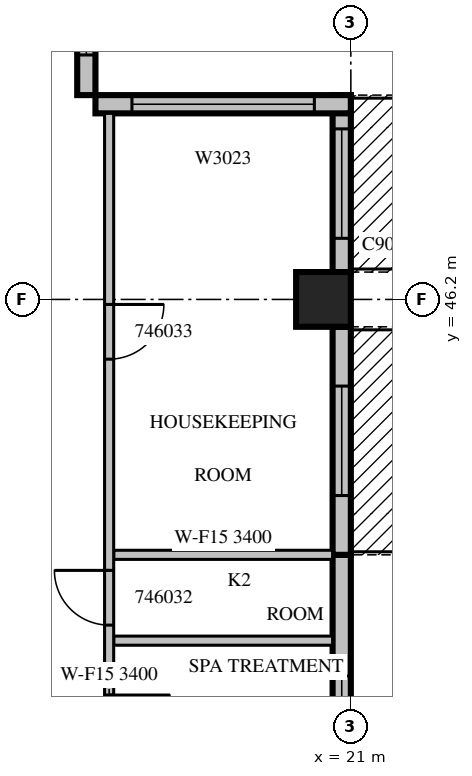
"""IFC4 building model, lengths in metres.
Left out: names, types, materials, properties, quantities, classifications, styles, units other than length and angle.
Written with IfcOpenShell. Run it as: python <this file> out.ifc"""

import sys

from ifc_helpers import new_model, si_unit, direction, frame, frame_2d, origin, origin_2d, place, context, subcontext, project, spatial, rectangle, extrude, source, transform, mapped, element, fill, save


model = new_model("IFC4")
c1 = context("Model", 3, precision=1e-05, world=origin(), true_north=direction((0.0, 1.0)))
c2 = subcontext(c1, "Body", "Model", "MODEL_VIEW")
j1 = project(units=[si_unit("LENGTHUNIT", "METRE"), si_unit("PLANEANGLEUNIT", "RADIAN")], contexts=[c1])
p1 = place(None, origin())
s1 = spatial("IfcSite", under=j1, at=p1, CompositionType="ELEMENT")
p2 = place(p1, origin())
s2 = spatial("IfcBuilding", under=s1, at=p2, CompositionType="ELEMENT")
p3 = place(p2, frame((0.0, 0.0, 208.2)))
s3 = spatial("IfcBuildingStorey", under=s2, at=p3, CompositionType="ELEMENT", Elevation=208.2)
m1 = source(origin(), c2, "Body", "SweptSolid", [
    extrude(rectangle(XDim=0.9, YDim=0.9, at=origin_2d()), origin(), (0.0, 0.0, 1.0), 3.8),
])
p4 = place(p3, frame((20.55, 46.2, 0.0), z_axis=(0.0, 0.0, 1.0), x_axis=(1.0, 0.0, 0.0)))
e1 = element("IfcColumn", 1, at=p4, inside=s3, PredefinedType="COLUMN", context=c2, shape_type="MappedRepresentation", body=[
    mapped(m1, transform((0.0, 0.0, 0.0), scale=1.0)),
])
m2 = source(origin(), c2, "Body", "SweptSolid", [
    extrude(rectangle(XDim=3.75, YDim=0.3, at=frame_2d((1.875, 0.0))), origin(), (0.0, 0.0, 1.0), 3.4),
])
p5 = place(p3, frame((20.85, 38.25, 0.0), z_axis=(0.0, 0.0, 1.0), x_axis=(0.0, 1.0, 0.0)))
e2 = element("IfcWall", 2, at=p5, inside=s3, PredefinedType="STANDARD", context=c2, shape_type="MappedRepresentation", body=[
    mapped(m2, transform((0.0, 0.0, 0.0), scale=1.0)),
])
m3 = source(origin(), c2, "Body", "SweptSolid", [
    extrude(rectangle(XDim=1.2, YDim=2.3, at=frame_2d((0.6, 1.15))), frame((0.0, 0.16, 0.0), z_axis=(0.0, -1.0, 0.0), x_axis=(1.0, 0.0, 0.0)), (0.0, 0.0, 1.0), 0.32),
])
p6 = place(p5, frame((0.557, 0.0, 0.6)))
e3 = element("IfcOpeningElement", 3, at=p6, cuts=e2, PredefinedType="OPENING", context=c2, shape_type="MappedRepresentation", body=[
    mapped(m3, transform((0.0, 0.0, 0.0), scale=1.0)),
])
p7 = place(p3, frame((20.85, 42.0, 0.0), z_axis=(0.0, 0.0, 1.0), x_axis=(0.0, 1.0, 0.0)))
e4 = element("IfcWall", 4, at=p7, inside=s3, PredefinedType="STANDARD", context=c2, shape_type="MappedRepresentation", body=[
    mapped(m2, transform((0.0, 0.0, 0.0), scale=1.0)),
])
m4 = source(origin(), c2, "Body", "SweptSolid", [
    extrude(rectangle(XDim=1.8, YDim=2.4, at=frame_2d((0.9, 1.2))), frame((0.0, 0.16, 0.0), z_axis=(0.0, -1.0, 0.0), x_axis=(1.0, 0.0, 0.0)), (0.0, 0.0, 1.0), 0.32),
])
p8 = place(p7, frame((0.975, 0.0, 0.0)))
e5 = element("IfcOpeningElement", 5, at=p8, cuts=e4, PredefinedType="OPENING", context=c2, shape_type="MappedRepresentation", body=[
    mapped(m4, transform((0.0, 0.0, 0.0), scale=1.0)),
])
m5 = source(origin(), c2, "Body", "SweptSolid", [
    extrude(rectangle(XDim=2.91, YDim=0.3, at=frame_2d((1.455, 0.0))), origin(), (0.0, 0.0, 1.0), 3.4),
])
p9 = place(p3, frame((20.85, 46.65, 0.0), z_axis=(0.0, 0.0, 1.0), x_axis=(0.0, 1.0, 0.0)))
e6 = element("IfcWall", 6, at=p9, inside=s3, PredefinedType="STANDARD", context=c2, shape_type="MappedRepresentation", body=[
    mapped(m5, transform((0.0, 0.0, 0.0), scale=1.0)),
])
p10 = place(p9, frame((0.555, 0.0, 0.0)))
e7 = element("IfcOpeningElement", 7, at=p10, cuts=e6, PredefinedType="OPENING", context=c2, shape_type="MappedRepresentation", body=[
    mapped(m4, transform((0.0, 0.0, 0.0), scale=1.0)),
])
m6 = source(origin(), c2, "Body", "SweptSolid", [
    extrude(rectangle(XDim=4.2, YDim=0.3, at=frame_2d((2.1, 0.0))), origin(), (0.0, 0.0, 1.0), 3.4),
])
p11 = place(p3, frame((21.0, 49.41, 0.0), z_axis=(0.0, 0.0, 1.0), x_axis=(-1.0, 0.0, 0.0)))
e8 = element("IfcWall", 8, at=p11, inside=s3, PredefinedType="STANDARD", context=c2, shape_type="MappedRepresentation", body=[
    mapped(m6, transform((0.0, 0.0, 0.0), scale=1.0)),
])
m7 = source(origin(), c2, "Body", "SweptSolid", [
    extrude(rectangle(XDim=3.0, YDim=2.3, at=frame_2d((1.5, 1.15))), frame((0.0, 0.16, 0.0), z_axis=(0.0, -1.0, 0.0), x_axis=(1.0, 0.0, 0.0)), (0.0, 0.0, 1.0), 0.32),
])
p12 = place(p11, frame((0.6, 0.0, 0.6)))
e9 = element("IfcOpeningElement", 9, at=p12, cuts=e8, PredefinedType="OPENING", context=c2, shape_type="MappedRepresentation", body=[
    mapped(m7, transform((0.0, 0.0, 0.0), scale=1.0)),
])
m8 = source(origin(), c2, "Body", "SweptSolid", [
    extrude(rectangle(XDim=2.52, YDim=0.3, at=frame_2d((1.26, 0.0))), origin(), (0.0, 0.0, 1.0), 3.4),
])
p13 = place(p3, frame((16.65, 49.56, 0.0), z_axis=(0.0, 0.0, 1.0), x_axis=(0.0, 1.0, 0.0)))
e10 = element("IfcWall", 10, at=p13, inside=s3, PredefinedType="STANDARD", context=c2, shape_type="MappedRepresentation", body=[
    mapped(m8, transform((0.0, 0.0, 0.0), scale=1.0)),
])
p14 = place(p13, frame((0.66, 0.0, 0.6)))
e11 = element("IfcOpeningElement", 11, at=p14, cuts=e10, PredefinedType="OPENING", context=c2, shape_type="MappedRepresentation", body=[
    mapped(m3, transform((0.0, 0.0, 0.0), scale=1.0)),
])
m9 = source(origin(), c2, "Body", "SweptSolid", [
    extrude(rectangle(XDim=3.6, YDim=0.15, at=frame_2d((1.8, 0.0))), origin(), (0.0, 0.0, 1.0), 3.4),
])
for number, where, z_axis, x_axis in (
    (12, (17.1, 40.589, 0.0), (0.0, 0.0, 1.0), (1.0, 0.0, 0.0)),
    (13, (20.7, 42.0, 0.0), (0.0, 0.0, 1.0), (-1.0, 0.0, 0.0)),
):
    element("IfcWall", number, at=place(p3, frame(where, z_axis=z_axis, x_axis=x_axis)), inside=s3, PredefinedType="PARTITIONING", context=c2, shape_type="MappedRepresentation", body=[
        mapped(m9, transform((0.0, 0.0, 0.0), scale=1.0)),
    ])
m10 = source(origin(), c2, "Body", "SweptSolid", [
    extrude(rectangle(XDim=19.86, YDim=0.15, at=frame_2d((9.93, 0.0))), origin(), (0.0, 0.0, 1.0), 3.4),
])
p15 = place(p3, frame((17.025, 49.26, 0.0), z_axis=(0.0, 0.0, 1.0), x_axis=(0.0, -1.0, 0.0)))
e14 = element("IfcWall", 14, at=p15, inside=s3, PredefinedType="PARTITIONING", context=c2, shape_type="MappedRepresentation", body=[
    mapped(m10, transform((0.0, 0.0, 0.0), scale=1.0)),
])
m11 = source(origin(), c2, "Body", "SweptSolid", [
    extrude(rectangle(XDim=1.0, YDim=2.1, at=frame_2d((0.5, 1.05))), frame((0.0, 0.085, 0.0), z_axis=(0.0, -1.0, 0.0), x_axis=(1.0, 0.0, 0.0)), (0.0, 0.0, 1.0), 0.17),
])
p16 = place(p15, frame((16.598, 0.0, 0.0)))
e15 = element("IfcOpeningElement", 15, at=p16, cuts=e14, PredefinedType="OPENING", context=c2, shape_type="MappedRepresentation", body=[
    mapped(m11, transform((0.0, 0.0, 0.0), scale=1.0)),
])
p17 = place(p15, frame((9.566, 0.0, 0.0)))
e16 = element("IfcOpeningElement", 16, at=p17, cuts=e14, PredefinedType="OPENING", context=c2, shape_type="MappedRepresentation", body=[
    mapped(m11, transform((0.0, 0.0, 0.0), scale=1.0)),
])
m12 = source(origin(), c2, "Body", "SweptSolid", [
    extrude(rectangle(XDim=0.9, YDim=2.1, at=frame_2d((0.45, 1.05))), frame((0.0, 0.085, 0.0), z_axis=(0.0, -1.0, 0.0), x_axis=(1.0, 0.0, 0.0)), (0.0, 0.0, 1.0), 0.17),
])
p18 = place(p15, frame((7.516, 0.0, 0.0)))
e17 = element("IfcOpeningElement", 17, at=p18, cuts=e14, PredefinedType="OPENING", context=c2, shape_type="MappedRepresentation", body=[
    mapped(m12, transform((0.0, 0.0, 0.0), scale=1.0)),
])
p19 = place(p15, frame((3.143, 0.0, 0.0)))
e18 = element("IfcOpeningElement", 18, at=p19, cuts=e14, PredefinedType="OPENING", context=c2, shape_type="MappedRepresentation", body=[
    mapped(m12, transform((0.0, 0.0, 0.0), scale=1.0)),
])
m13 = source(origin(), c2, "Body", "SweptSolid", [
    extrude(rectangle(XDim=1.2, YDim=2.3, at=frame_2d((0.6, 1.15))), frame((0.0, 0.03, 0.0), z_axis=(0.0, -1.0, 0.0), x_axis=(1.0, 0.0, 0.0)), (0.0, 0.0, 1.0), 0.06),
])
p20 = place(p6, origin())
e19 = element("IfcWindow", 19, at=p20, inside=s3, PartitioningType="SINGLE_PANEL", PredefinedType="WINDOW", context=c2, shape_type="MappedRepresentation", body=[
    mapped(m13, transform((0.0, 0.0, 0.0), scale=1.0)),
])
fill(e3, e19)
m14 = source(origin(), c2, "Body", "SweptSolid", [
    extrude(rectangle(XDim=1.8, YDim=2.4, at=frame_2d((0.9, 1.2))), frame((0.0, 0.025, 0.0), z_axis=(0.0, -1.0, 0.0), x_axis=(1.0, 0.0, 0.0)), (0.0, 0.0, 1.0), 0.05),
])
p21 = place(p8, origin())
e20 = element("IfcDoor", 20, at=p21, inside=s3, OperationType="SLIDING_TO_LEFT", PredefinedType="DOOR", context=c2, shape_type="MappedRepresentation", body=[
    mapped(m14, transform((0.0, 0.0, 0.0), scale=1.0)),
])
fill(e5, e20)
p22 = place(p10, origin())
e21 = element("IfcDoor", 21, at=p22, inside=s3, OperationType="SLIDING_TO_LEFT", PredefinedType="DOOR", context=c2, shape_type="MappedRepresentation", body=[
    mapped(m14, transform((0.0, 0.0, 0.0), scale=1.0)),
])
fill(e7, e21)
m15 = source(origin(), c2, "Body", "SweptSolid", [
    extrude(rectangle(XDim=3.0, YDim=2.3, at=frame_2d((1.5, 1.15))), frame((0.0, 0.03, 0.0), z_axis=(0.0, -1.0, 0.0), x_axis=(1.0, 0.0, 0.0)), (0.0, 0.0, 1.0), 0.06),
])
p23 = place(p12, origin())
e22 = element("IfcWindow", 22, at=p23, inside=s3, PartitioningType="SINGLE_PANEL", PredefinedType="WINDOW", context=c2, shape_type="MappedRepresentation", body=[
    mapped(m15, transform((0.0, 0.0, 0.0), scale=1.0)),
])
fill(e9, e22)
p24 = place(p14, origin())
e23 = element("IfcWindow", 23, at=p24, inside=s3, PartitioningType="SINGLE_PANEL", PredefinedType="WINDOW", context=c2, shape_type="MappedRepresentation", body=[
    mapped(m13, transform((0.0, 0.0, 0.0), scale=1.0)),
])
fill(e11, e23)
m16 = source(origin(), c2, "Body", "SweptSolid", [
    extrude(rectangle(XDim=1.0, YDim=2.1, at=frame_2d((0.5, 1.05))), frame((0.0, 0.025, 0.0), z_axis=(0.0, -1.0, 0.0), x_axis=(1.0, 0.0, 0.0)), (0.0, 0.0, 1.0), 0.05),
])
p25 = place(p17, origin())
e24 = element("IfcDoor", 24, at=p25, inside=s3, OperationType="SINGLE_SWING_LEFT", PredefinedType="DOOR", context=c2, shape_type="MappedRepresentation", body=[
    mapped(m16, transform((0.0, 0.0, 0.0), scale=1.0)),
])
fill(e16, e24)
m17 = source(origin(), c2, "Body", "SweptSolid", [
    extrude(rectangle(XDim=0.9, YDim=2.1, at=frame_2d((0.45, 1.05))), frame((0.0, 0.025, 0.0), z_axis=(0.0, -1.0, 0.0), x_axis=(1.0, 0.0, 0.0)), (0.0, 0.0, 1.0), 0.05),
])
p26 = place(p18, origin())
e25 = element("IfcDoor", 25, at=p26, inside=s3, OperationType="SINGLE_SWING_RIGHT", PredefinedType="DOOR", context=c2, shape_type="MappedRepresentation", body=[
    mapped(m17, transform((0.0, 0.0, 0.0), scale=1.0)),
])
fill(e17, e25)
p27 = place(p19, origin())
e26 = element("IfcDoor", 26, at=p27, inside=s3, OperationType="SINGLE_SWING_LEFT", PredefinedType="DOOR", context=c2, shape_type="MappedRepresentation", body=[
    mapped(m17, transform((0.0, 0.0, 0.0), scale=1.0)),
])
fill(e18, e26)
save(model, sys.argv[1])
